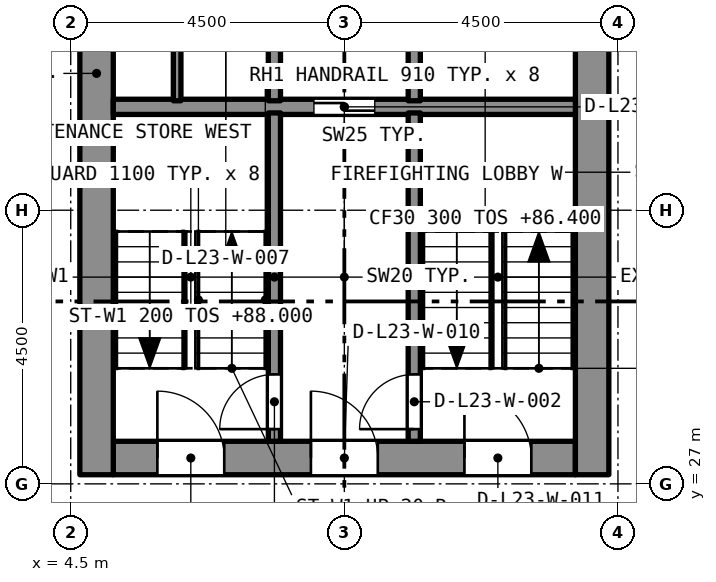
"""IFC4 building model, lengths in metres.
Left out: names, types, materials, properties, quantities, classifications, styles, units other than length and angle.
Written with IfcOpenShell. Run it as: python <this file> out.ifc"""

import sys

from ifc_helpers import new_model, si_unit, direction, frame, frame_2d, origin, place, context, subcontext, project, spatial, rectangle, extrude, element, fill, save


model = new_model("IFC4")
c1 = context("Model", 3, precision=1e-05, world=origin(), true_north=direction((0.0, 1.0)))
c2 = subcontext(c1, "Body", "Model", "MODEL_VIEW")
j1 = project(units=[si_unit("LENGTHUNIT", "METRE"), si_unit("PLANEANGLEUNIT", "RADIAN")], contexts=[c1])
p1 = place(None, origin())
s1 = spatial("IfcSite", under=j1, at=p1, CompositionType="ELEMENT")
p2 = place(p1, origin())
s2 = spatial("IfcBuilding", under=s1, at=p2, CompositionType="ELEMENT")
p3 = place(p2, frame((0.0, 0.0, 86.4)))
s3 = spatial("IfcBuildingStorey", under=s2, at=p3, CompositionType="ELEMENT", Elevation=86.4)
p4 = place(p3, frame((5.2, 27.425, 0.0), z_axis=(0.0, 0.0, 1.0), x_axis=(1.0, 0.0, 0.0)))
e1 = element("IfcWall", 1, at=p4, inside=s3, PredefinedType="SOLIDWALL", context=c2, shape_type="SweptSolid", body=[
    extrude(rectangle(XDim=7.6, YDim=0.55, at=frame_2d((3.8, 0.0))), origin(), (0.0, 0.0, 1.0), 3.2),
])
p5 = place(p4, frame((0.725, 0.0, 0.0)))
e2 = element("IfcOpeningElement", 2, at=p5, cuts=e1, PredefinedType="OPENING", context=c2, shape_type="SweptSolid", body=[
    extrude(rectangle(XDim=1.1, YDim=2.1, at=frame_2d((0.55, 1.05))), frame((0.0, 0.285, 0.0), z_axis=(0.0, -1.0, 0.0), x_axis=(1.0, 0.0, 0.0)), (0.0, 0.0, 1.0), 0.57),
])
p6 = place(p4, frame((3.25, 0.0, 0.0)))
e3 = element("IfcOpeningElement", 3, at=p6, cuts=e1, PredefinedType="OPENING", context=c2, shape_type="SweptSolid", body=[
    extrude(rectangle(XDim=1.1, YDim=2.1, at=frame_2d((0.55, 1.05))), frame((0.0, 0.285, 0.0), z_axis=(0.0, -1.0, 0.0), x_axis=(1.0, 0.0, 0.0)), (0.0, 0.0, 1.0), 0.57),
])
p7 = place(p4, frame((5.775, 0.0, 0.0)))
e4 = element("IfcOpeningElement", 4, at=p7, cuts=e1, PredefinedType="OPENING", context=c2, shape_type="SweptSolid", body=[
    extrude(rectangle(XDim=1.1, YDim=2.1, at=frame_2d((0.55, 1.05))), frame((0.0, 0.285, 0.0), z_axis=(0.0, -1.0, 0.0), x_axis=(1.0, 0.0, 0.0)), (0.0, 0.0, 1.0), 0.57),
])
p8 = place(p3, frame((4.925, 27.15, 0.0), z_axis=(0.0, 0.0, 1.0), x_axis=(0.0, 1.0, 0.0)))
e5 = element("IfcWall", 5, at=p8, inside=s3, PredefinedType="SOLIDWALL", context=c2, shape_type="SweptSolid", body=[
    extrude(rectangle(XDim=13.2, YDim=0.55, at=frame_2d((6.6, 0.0))), origin(), (0.0, 0.0, 1.0), 3.2),
])
p9 = place(p8, frame((8.8, 0.0, 0.0)))
e6 = element("IfcOpeningElement", 6, at=p9, cuts=e5, PredefinedType="OPENING", context=c2, shape_type="SweptSolid", body=[
    extrude(rectangle(XDim=1.2, YDim=2.1, at=frame_2d((0.6, 1.05))), frame((0.0, 0.285, 0.0), z_axis=(0.0, -1.0, 0.0), x_axis=(1.0, 0.0, 0.0)), (0.0, 0.0, 1.0), 0.57),
])
p10 = place(p3, frame((13.075, 27.15, 0.0), z_axis=(0.0, 0.0, 1.0), x_axis=(0.0, 1.0, 0.0)))
e7 = element("IfcWall", 7, at=p10, inside=s3, PredefinedType="SOLIDWALL", context=c2, shape_type="SweptSolid", body=[
    extrude(rectangle(XDim=13.2, YDim=0.55, at=frame_2d((6.6, 0.0))), origin(), (0.0, 0.0, 1.0), 3.2),
])
p11 = place(p10, frame((10.95, 0.0, 0.0)))
e8 = element("IfcOpeningElement", 8, at=p11, cuts=e7, PredefinedType="OPENING", context=c2, shape_type="SweptSolid", body=[
    extrude(rectangle(XDim=1.1, YDim=2.1, at=frame_2d((0.55, 1.05))), frame((0.0, 0.285, 0.0), z_axis=(0.0, -1.0, 0.0), x_axis=(1.0, 0.0, 0.0)), (0.0, 0.0, 1.0), 0.57),
])
p12 = place(p10, frame((8.8, 0.0, 0.0)))
e9 = element("IfcOpeningElement", 9, at=p12, cuts=e7, PredefinedType="OPENING", context=c2, shape_type="SweptSolid", body=[
    extrude(rectangle(XDim=1.2, YDim=2.1, at=frame_2d((0.6, 1.05))), frame((0.0, 0.285, 0.0), z_axis=(0.0, -1.0, 0.0), x_axis=(1.0, 0.0, 0.0)), (0.0, 0.0, 1.0), 0.57),
])
p13 = place(p3, frame((5.2, 33.2, 0.0), z_axis=(0.0, 0.0, 1.0), x_axis=(1.0, 0.0, 0.0)))
e10 = element("IfcWall", 10, at=p13, inside=s3, PredefinedType="SOLIDWALL", context=c2, shape_type="SweptSolid", body=[
    extrude(rectangle(XDim=7.6, YDim=0.25, at=frame_2d((3.8, 0.0))), origin(), (0.0, 0.0, 1.0), 2.9),
])
p14 = place(p13, frame((3.3, 0.0, 0.0)))
e11 = element("IfcOpeningElement", 11, at=p14, cuts=e10, PredefinedType="OPENING", context=c2, shape_type="SweptSolid", body=[
    extrude(rectangle(XDim=1.0, YDim=2.1, at=frame_2d((0.5, 1.05))), frame((0.0, 0.135, 0.0), z_axis=(0.0, -1.0, 0.0), x_axis=(1.0, 0.0, 0.0)), (0.0, 0.0, 1.0), 0.27),
])
p15 = place(p3, frame((7.85, 27.7, 0.0), z_axis=(0.0, 0.0, 1.0), x_axis=(0.0, 1.0, 0.0)))
e12 = element("IfcWall", 12, at=p15, inside=s3, PredefinedType="SOLIDWALL", context=c2, shape_type="SweptSolid", body=[
    extrude(rectangle(XDim=5.4, YDim=0.2, at=frame_2d((2.7, 0.0))), origin(), (0.0, 0.0, 1.0), 2.9),
])
p16 = place(p15, frame((0.2, 0.0, 0.0)))
e13 = element("IfcOpeningElement", 13, at=p16, cuts=e12, PredefinedType="OPENING", context=c2, shape_type="SweptSolid", body=[
    extrude(rectangle(XDim=0.9, YDim=2.1, at=frame_2d((0.45, 1.05))), frame((0.0, 0.11, 0.0), z_axis=(0.0, -1.0, 0.0), x_axis=(1.0, 0.0, 0.0)), (0.0, 0.0, 1.0), 0.22),
])
p17 = place(p3, frame((10.15, 27.7, 0.0), z_axis=(0.0, 0.0, 1.0), x_axis=(0.0, 1.0, 0.0)))
e14 = element("IfcWall", 14, at=p17, inside=s3, PredefinedType="SOLIDWALL", context=c2, shape_type="SweptSolid", body=[
    extrude(rectangle(XDim=5.4, YDim=0.2, at=frame_2d((2.7, 0.0))), origin(), (0.0, 0.0, 1.0), 2.9),
])
p18 = place(p17, frame((0.2, 0.0, 0.0)))
e15 = element("IfcOpeningElement", 15, at=p18, cuts=e14, PredefinedType="OPENING", context=c2, shape_type="SweptSolid", body=[
    extrude(rectangle(XDim=0.9, YDim=2.1, at=frame_2d((0.45, 1.05))), frame((0.0, 0.11, 0.0), z_axis=(0.0, -1.0, 0.0), x_axis=(1.0, 0.0, 0.0)), (0.0, 0.0, 1.0), 0.22),
])
for number, where, z_axis, x_axis in (
    (16, (7.85, 33.3, 0.0), (0.0, 0.0, 1.0), (0.0, 1.0, 0.0)),
    (17, (10.15, 33.3, 0.0), (0.0, 0.0, 1.0), (0.0, 1.0, 0.0)),
):
    element("IfcWall", number, at=place(p3, frame(where, z_axis=z_axis, x_axis=x_axis)), inside=s3, PredefinedType="SOLIDWALL", context=c2, shape_type="SweptSolid", body=[
        extrude(rectangle(XDim=2.3, YDim=0.2, at=frame_2d((1.15, 0.0))), origin(), (0.0, 0.0, 1.0), 2.9),
    ])
p19 = place(p3, frame((6.25, 33.3, 0.0), z_axis=(0.0, 0.0, 1.0), x_axis=(0.0, 1.0, 0.0)))
e18 = element("IfcWall", 18, at=p19, inside=s3, PredefinedType="PARTITIONING", context=c2, shape_type="SweptSolid", body=[
    extrude(rectangle(XDim=2.3, YDim=0.125, at=frame_2d((1.15, 0.0))), origin(), (0.0, 0.0, 1.0), 2.9),
])
p20 = place(p16, origin())
e19 = element("IfcDoor", 19, at=p20, inside=s3, OperationType="SINGLE_SWING_LEFT", PredefinedType="DOOR", context=c2, shape_type="SweptSolid", body=[
    extrude(rectangle(XDim=0.9, YDim=2.1, at=frame_2d((0.45, 1.05))), frame((0.0, 0.025, 0.0), z_axis=(0.0, -1.0, 0.0), x_axis=(1.0, 0.0, 0.0)), (0.0, 0.0, 1.0), 0.05),
])
fill(e13, e19)
p21 = place(p18, origin())
e20 = element("IfcDoor", 20, at=p21, inside=s3, OperationType="SINGLE_SWING_LEFT", PredefinedType="DOOR", context=c2, shape_type="SweptSolid", body=[
    extrude(rectangle(XDim=0.9, YDim=2.1, at=frame_2d((0.45, 1.05))), frame((0.0, 0.025, 0.0), z_axis=(0.0, -1.0, 0.0), x_axis=(1.0, 0.0, 0.0)), (0.0, 0.0, 1.0), 0.05),
])
fill(e15, e20)
p22 = place(p14, origin())
e21 = element("IfcDoor", 21, at=p22, inside=s3, OperationType="SLIDING_TO_LEFT", PredefinedType="DOOR", context=c2, shape_type="SweptSolid", body=[
    extrude(rectangle(XDim=1.0, YDim=2.1, at=frame_2d((0.5, 1.05))), frame((0.0, 0.025, 0.0), z_axis=(0.0, -1.0, 0.0), x_axis=(1.0, 0.0, 0.0)), (0.0, 0.0, 1.0), 0.05),
])
fill(e11, e21)
p23 = place(p5, origin())
e22 = element("IfcDoor", 22, at=p23, inside=s3, OperationType="SINGLE_SWING_LEFT", PredefinedType="DOOR", context=c2, shape_type="SweptSolid", body=[
    extrude(rectangle(XDim=1.1, YDim=2.1, at=frame_2d((0.55, 1.05))), frame((0.0, 0.025, 0.0), z_axis=(0.0, -1.0, 0.0), x_axis=(1.0, 0.0, 0.0)), (0.0, 0.0, 1.0), 0.05),
])
fill(e2, e22)
p24 = place(p6, origin())
e23 = element("IfcDoor", 23, at=p24, inside=s3, OperationType="SINGLE_SWING_LEFT", PredefinedType="DOOR", context=c2, shape_type="SweptSolid", body=[
    extrude(rectangle(XDim=1.1, YDim=2.1, at=frame_2d((0.55, 1.05))), frame((0.0, 0.025, 0.0), z_axis=(0.0, -1.0, 0.0), x_axis=(1.0, 0.0, 0.0)), (0.0, 0.0, 1.0), 0.05),
])
fill(e3, e23)
p25 = place(p7, origin())
e24 = element("IfcDoor", 24, at=p25, inside=s3, OperationType="SINGLE_SWING_LEFT", PredefinedType="DOOR", context=c2, shape_type="SweptSolid", body=[
    extrude(rectangle(XDim=1.1, YDim=2.1, at=frame_2d((0.55, 1.05))), frame((0.0, 0.025, 0.0), z_axis=(0.0, -1.0, 0.0), x_axis=(1.0, 0.0, 0.0)), (0.0, 0.0, 1.0), 0.05),
])
fill(e4, e24)
save(model, sys.argv[1])
